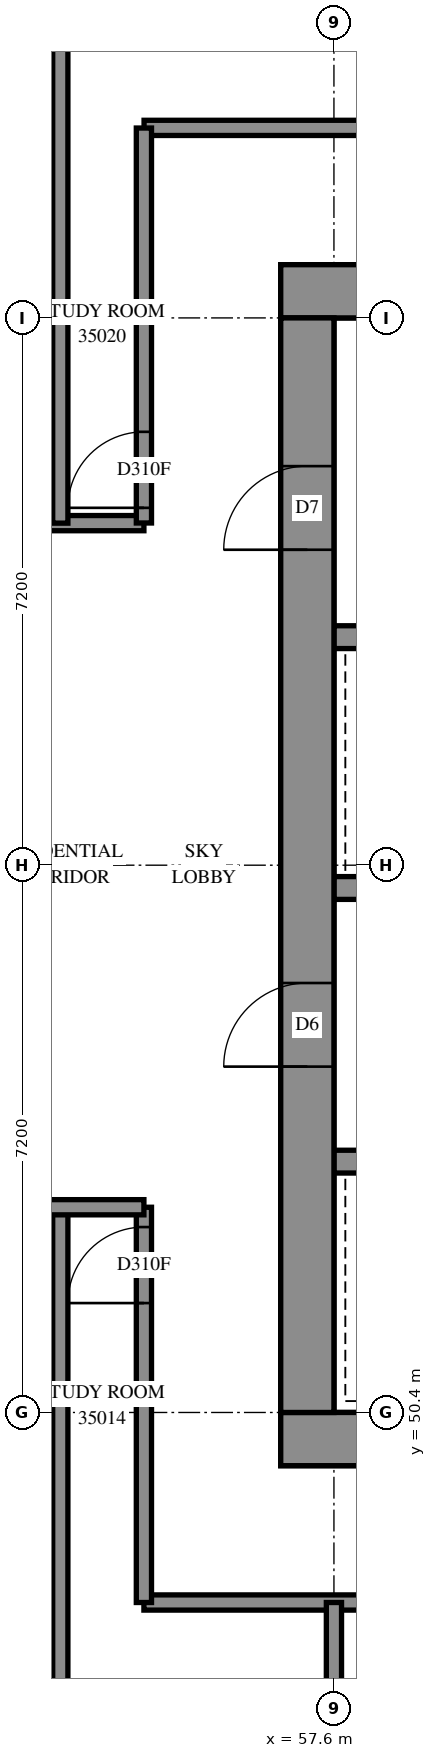
"""IFC4 building model, lengths in metres.
Left out: names, types, materials, properties, quantities, classifications, styles, units other than length and angle.
Written with IfcOpenShell. Run it as: python <this file> out.ifc"""

import sys

from ifc_helpers import new_model, si_unit, direction, frame, frame_2d, origin, place, context, subcontext, project, spatial, rectangle, extrude, element, fill, save


model = new_model("IFC4")
c1 = context("Model", 3, precision=1e-05, world=origin(), true_north=direction((0.0, 1.0)))
c2 = subcontext(c1, "Body", "Model", "MODEL_VIEW")
j1 = project(units=[si_unit("LENGTHUNIT", "METRE"), si_unit("PLANEANGLEUNIT", "RADIAN")], contexts=[c1])
p1 = place(None, origin())
s1 = spatial("IfcSite", under=j1, at=p1, CompositionType="ELEMENT")
p2 = place(p1, origin())
s2 = spatial("IfcBuilding", under=s1, at=p2, CompositionType="ELEMENT")
p3 = place(p2, frame((0.0, 0.0, 131.2)))
s3 = spatial("IfcBuildingStorey", under=s2, at=p3, CompositionType="ELEMENT", Elevation=131.2)
p4 = place(p3, frame((56.9, 50.05, -0.3), z_axis=(0.0, 0.0, 1.0), x_axis=(1.0, 0.0, 0.0)))
e1 = element("IfcWall", 1, at=p4, inside=s3, PredefinedType="SHEAR", context=c2, shape_type="SweptSolid", body=[
    extrude(rectangle(XDim=15.8, YDim=0.7, at=frame_2d((7.9, 0.0))), origin(), (0.0, 0.0, 1.0), 3.5),
])
p5 = place(p3, frame((56.9, 65.15, -0.3), z_axis=(0.0, 0.0, 1.0), x_axis=(1.0, 0.0, 0.0)))
e2 = element("IfcWall", 2, at=p5, inside=s3, PredefinedType="SHEAR", context=c2, shape_type="SweptSolid", body=[
    extrude(rectangle(XDim=15.8, YDim=0.7, at=frame_2d((7.9, 0.0))), origin(), (0.0, 0.0, 1.0), 3.5),
])
p6 = place(p5, frame((10.7, 0.0, 0.3)))
e3 = element("IfcOpeningElement", 3, at=p6, cuts=e2, PredefinedType="OPENING", context=c2, shape_type="SweptSolid", body=[
    extrude(rectangle(XDim=0.8, YDim=2.1, at=frame_2d((0.4, 1.05))), frame((0.0, 0.36, 0.0), z_axis=(0.0, -1.0, 0.0), x_axis=(1.0, 0.0, 0.0)), (0.0, 0.0, 1.0), 0.72),
])
p7 = place(p3, frame((57.25, 50.4, -0.3), z_axis=(0.0, 0.0, 1.0), x_axis=(0.0, 1.0, 0.0)))
e4 = element("IfcWall", 4, at=p7, inside=s3, PredefinedType="SHEAR", context=c2, shape_type="SweptSolid", body=[
    extrude(rectangle(XDim=14.4, YDim=0.7, at=frame_2d((7.2, 0.0))), origin(), (0.0, 0.0, 1.0), 3.5),
])
p8 = place(p7, frame((4.55, 0.0, 0.3)))
e5 = element("IfcOpeningElement", 5, at=p8, cuts=e4, PredefinedType="OPENING", context=c2, shape_type="SweptSolid", body=[
    extrude(rectangle(XDim=1.1, YDim=2.1, at=frame_2d((0.55, 1.05))), frame((0.0, 0.36, 0.0), z_axis=(0.0, -1.0, 0.0), x_axis=(1.0, 0.0, 0.0)), (0.0, 0.0, 1.0), 0.72),
])
p9 = place(p7, frame((11.35, 0.0, 0.3)))
e6 = element("IfcOpeningElement", 6, at=p9, cuts=e4, PredefinedType="OPENING", context=c2, shape_type="SweptSolid", body=[
    extrude(rectangle(XDim=1.1, YDim=2.1, at=frame_2d((0.55, 1.05))), frame((0.0, 0.36, 0.0), z_axis=(0.0, -1.0, 0.0), x_axis=(1.0, 0.0, 0.0)), (0.0, 0.0, 1.0), 0.72),
])
p10 = place(p3, frame((57.6, 53.7, 0.0), z_axis=(0.0, 0.0, 1.0), x_axis=(1.0, 0.0, 0.0)))
e7 = element("IfcWall", 7, at=p10, inside=s3, PredefinedType="SOLIDWALL", context=c2, shape_type="SweptSolid", body=[
    extrude(rectangle(XDim=14.4, YDim=0.3, at=frame_2d((7.2, 0.0))), origin(), (0.0, 0.0, 1.0), 3.9),
])
p11 = place(p10, frame((1.25, 0.0, 0.0)))
e8 = element("IfcOpeningElement", 8, at=p11, cuts=e7, PredefinedType="OPENING", context=c2, shape_type="SweptSolid", body=[
    extrude(rectangle(XDim=1.1, YDim=2.1, at=frame_2d((0.55, 1.05))), frame((0.0, 0.16, 0.0), z_axis=(0.0, -1.0, 0.0), x_axis=(1.0, 0.0, 0.0)), (0.0, 0.0, 1.0), 0.32),
])
p12 = place(p10, frame((4.85, 0.0, 0.0)))
e9 = element("IfcOpeningElement", 9, at=p12, cuts=e7, PredefinedType="OPENING", context=c2, shape_type="SweptSolid", body=[
    extrude(rectangle(XDim=1.1, YDim=2.1, at=frame_2d((0.55, 1.05))), frame((0.0, 0.16, 0.0), z_axis=(0.0, -1.0, 0.0), x_axis=(1.0, 0.0, 0.0)), (0.0, 0.0, 1.0), 0.32),
])
p13 = place(p10, frame((8.45, 0.0, 0.0)))
e10 = element("IfcOpeningElement", 10, at=p13, cuts=e7, PredefinedType="OPENING", context=c2, shape_type="SweptSolid", body=[
    extrude(rectangle(XDim=1.1, YDim=2.1, at=frame_2d((0.55, 1.05))), frame((0.0, 0.16, 0.0), z_axis=(0.0, -1.0, 0.0), x_axis=(1.0, 0.0, 0.0)), (0.0, 0.0, 1.0), 0.32),
])
p14 = place(p10, frame((12.05, 0.0, 0.0)))
e11 = element("IfcOpeningElement", 11, at=p14, cuts=e7, PredefinedType="OPENING", context=c2, shape_type="SweptSolid", body=[
    extrude(rectangle(XDim=1.1, YDim=2.1, at=frame_2d((0.55, 1.05))), frame((0.0, 0.16, 0.0), z_axis=(0.0, -1.0, 0.0), x_axis=(1.0, 0.0, 0.0)), (0.0, 0.0, 1.0), 0.32),
])
p15 = place(p3, frame((57.6, 57.3, 0.0), z_axis=(0.0, 0.0, 1.0), x_axis=(1.0, 0.0, 0.0)))
e12 = element("IfcWall", 12, at=p15, inside=s3, PredefinedType="SOLIDWALL", context=c2, shape_type="SweptSolid", body=[
    extrude(rectangle(XDim=14.4, YDim=0.3, at=frame_2d((7.2, 0.0))), origin(), (0.0, 0.0, 1.0), 3.9),
])
p16 = place(p15, frame((1.25, 0.0, 0.0)))
e13 = element("IfcOpeningElement", 13, at=p16, cuts=e12, PredefinedType="OPENING", context=c2, shape_type="SweptSolid", body=[
    extrude(rectangle(XDim=1.1, YDim=2.1, at=frame_2d((0.55, 1.05))), frame((0.0, 0.16, 0.0), z_axis=(0.0, -1.0, 0.0), x_axis=(1.0, 0.0, 0.0)), (0.0, 0.0, 1.0), 0.32),
])
p17 = place(p15, frame((4.85, 0.0, 0.0)))
e14 = element("IfcOpeningElement", 14, at=p17, cuts=e12, PredefinedType="OPENING", context=c2, shape_type="SweptSolid", body=[
    extrude(rectangle(XDim=1.1, YDim=2.1, at=frame_2d((0.55, 1.05))), frame((0.0, 0.16, 0.0), z_axis=(0.0, -1.0, 0.0), x_axis=(1.0, 0.0, 0.0)), (0.0, 0.0, 1.0), 0.32),
])
p18 = place(p15, frame((8.45, 0.0, 0.0)))
e15 = element("IfcOpeningElement", 15, at=p18, cuts=e12, PredefinedType="OPENING", context=c2, shape_type="SweptSolid", body=[
    extrude(rectangle(XDim=1.1, YDim=2.1, at=frame_2d((0.55, 1.05))), frame((0.0, 0.16, 0.0), z_axis=(0.0, -1.0, 0.0), x_axis=(1.0, 0.0, 0.0)), (0.0, 0.0, 1.0), 0.32),
])
p19 = place(p15, frame((12.05, 0.0, 0.0)))
e16 = element("IfcOpeningElement", 16, at=p19, cuts=e12, PredefinedType="OPENING", context=c2, shape_type="SweptSolid", body=[
    extrude(rectangle(XDim=1.1, YDim=2.1, at=frame_2d((0.55, 1.05))), frame((0.0, 0.16, 0.0), z_axis=(0.0, -1.0, 0.0), x_axis=(1.0, 0.0, 0.0)), (0.0, 0.0, 1.0), 0.32),
])
p20 = place(p3, frame((57.6, 60.6, 0.0), z_axis=(0.0, 0.0, 1.0), x_axis=(1.0, 0.0, 0.0)))
e17 = element("IfcWall", 17, at=p20, inside=s3, PredefinedType="SOLIDWALL", context=c2, shape_type="SweptSolid", body=[
    extrude(rectangle(XDim=7.2, YDim=0.3, at=frame_2d((3.6, 0.0))), origin(), (0.0, 0.0, 1.0), 3.9),
])
p21 = place(p3, frame((55.102, 67.3, 0.0), z_axis=(0.0, 0.0, 1.0), x_axis=(1.0, 0.0, 0.0)))
e18 = element("IfcWall", 18, at=p21, inside=s3, PredefinedType="PARTITIONING", context=c2, shape_type="SweptSolid", body=[
    extrude(rectangle(XDim=19.398, YDim=0.2, at=frame_2d((9.699, 0.0))), origin(), (0.0, 0.0, 1.0), 3.9),
])
p22 = place(p21, frame((8.435, 0.0, 0.0)))
e19 = element("IfcOpeningElement", 19, at=p22, cuts=e18, PredefinedType="OPENING", context=c2, shape_type="SweptSolid", body=[
    extrude(rectangle(XDim=1.0, YDim=2.1, at=frame_2d((0.5, 1.05))), frame((0.0, 0.11, 0.0), z_axis=(0.0, -1.0, 0.0), x_axis=(1.0, 0.0, 0.0)), (0.0, 0.0, 1.0), 0.22),
])
p23 = place(p3, frame((55.1, 47.9, 0.0), z_axis=(0.0, 0.0, 1.0), x_axis=(1.0, 0.0, 0.0)))
e20 = element("IfcWall", 20, at=p23, inside=s3, PredefinedType="PARTITIONING", context=c2, shape_type="SweptSolid", body=[
    extrude(rectangle(XDim=19.208, YDim=0.2, at=frame_2d((9.604, 0.0))), origin(), (0.0, 0.0, 1.0), 3.9),
])
p24 = place(p3, frame((40.502, 62.1, 0.0), z_axis=(0.0, 0.0, 1.0), x_axis=(1.0, 0.0, 0.0)))
e21 = element("IfcWall", 21, at=p24, inside=s3, PredefinedType="PARTITIONING", context=c2, shape_type="SweptSolid", body=[
    extrude(rectangle(XDim=14.598, YDim=0.2, at=frame_2d((7.299, 0.0))), origin(), (0.0, 0.0, 1.0), 3.9),
])
p25 = place(p24, frame((0.265, 0.0, 0.0)))
e22 = element("IfcOpeningElement", 22, at=p25, cuts=e21, PredefinedType="OPENING", context=c2, shape_type="SweptSolid", body=[
    extrude(rectangle(XDim=1.0, YDim=2.1, at=frame_2d((0.5, 1.05))), frame((0.0, 0.11, 0.0), z_axis=(0.0, -1.0, 0.0), x_axis=(1.0, 0.0, 0.0)), (0.0, 0.0, 1.0), 0.22),
])
p26 = place(p24, frame((11.991, 0.0, 0.0)))
e23 = element("IfcOpeningElement", 23, at=p26, cuts=e21, PredefinedType="OPENING", context=c2, shape_type="SweptSolid", body=[
    extrude(rectangle(XDim=1.0, YDim=2.1, at=frame_2d((0.5, 1.05))), frame((0.0, 0.11, 0.0), z_axis=(0.0, -1.0, 0.0), x_axis=(1.0, 0.0, 0.0)), (0.0, 0.0, 1.0), 0.22),
])
for number, where, z_axis, x_axis in (
    (24, (54.0, 45.73, 0.0), (0.0, 0.0, 1.0), (0.0, 1.0, 0.0)),
    (25, (54.0, 62.1, 0.0), (0.0, 0.0, 1.0), (0.0, 1.0, 0.0)),
):
    element("IfcWall", number, at=place(p3, frame(where, z_axis=z_axis, x_axis=x_axis)), inside=s3, PredefinedType="PARTITIONING", context=c2, shape_type="SweptSolid", body=[
        extrude(rectangle(XDim=7.37, YDim=0.2, at=frame_2d((3.685, 0.0))), origin(), (0.0, 0.0, 1.0), 3.9),
    ])
p27 = place(p3, frame((55.1, 47.9, 0.0), z_axis=(0.0, 0.0, 1.0), x_axis=(0.0, 1.0, 0.0)))
e26 = element("IfcWall", 26, at=p27, inside=s3, PredefinedType="PARTITIONING", context=c2, shape_type="SweptSolid", body=[
    extrude(rectangle(XDim=5.2, YDim=0.2, at=frame_2d((2.6, 0.0))), origin(), (0.0, 0.0, 1.0), 3.9),
])
p28 = place(p27, frame((3.939, 0.0, 0.0)))
e27 = element("IfcOpeningElement", 27, at=p28, cuts=e26, PredefinedType="OPENING", context=c2, shape_type="SweptSolid", body=[
    extrude(rectangle(XDim=1.0, YDim=2.1, at=frame_2d((0.5, 1.05))), frame((0.0, 0.11, 0.0), z_axis=(0.0, -1.0, 0.0), x_axis=(1.0, 0.0, 0.0)), (0.0, 0.0, 1.0), 0.22),
])
p29 = place(p3, frame((55.1, 62.102, 0.0), z_axis=(0.0, 0.0, 1.0), x_axis=(0.0, 1.0, 0.0)))
e28 = element("IfcWall", 28, at=p29, inside=s3, PredefinedType="PARTITIONING", context=c2, shape_type="SweptSolid", body=[
    extrude(rectangle(XDim=5.196, YDim=0.2, at=frame_2d((2.598, 0.0))), origin(), (0.0, 0.0, 1.0), 3.9),
])
p30 = place(p29, frame((0.199, 0.0, 0.0)))
e29 = element("IfcOpeningElement", 29, at=p30, cuts=e28, PredefinedType="OPENING", context=c2, shape_type="SweptSolid", body=[
    extrude(rectangle(XDim=1.0, YDim=2.1, at=frame_2d((0.5, 1.05))), frame((0.0, 0.11, 0.0), z_axis=(0.0, -1.0, 0.0), x_axis=(1.0, 0.0, 0.0)), (0.0, 0.0, 1.0), 0.22),
])
p31 = place(p3, frame((50.4, 53.1, 0.0), z_axis=(0.0, 0.0, 1.0), x_axis=(1.0, 0.0, 0.0)))
e30 = element("IfcWall", 30, at=p31, inside=s3, PredefinedType="PARTITIONING", context=c2, shape_type="SweptSolid", body=[
    extrude(rectangle(XDim=4.7, YDim=0.2, at=frame_2d((2.35, 0.0))), origin(), (0.0, 0.0, 1.0), 3.9),
])
p32 = place(p3, frame((57.6, 45.73, 0.0), z_axis=(0.0, 0.0, 1.0), x_axis=(0.0, 1.0, 0.0)))
e31 = element("IfcWall", 31, at=p32, inside=s3, PredefinedType="PARTITIONING", context=c2, shape_type="SweptSolid", body=[
    extrude(rectangle(XDim=2.17, YDim=0.2, at=frame_2d((1.085, 0.0))), origin(), (0.0, 0.0, 1.0), 3.9),
])
p33 = place(p8, origin())
e32 = element("IfcDoor", 32, at=p33, inside=s3, OperationType="DOUBLE_DOOR_SINGLE_SWING", PredefinedType="DOOR", context=c2, shape_type="SweptSolid", body=[
    extrude(rectangle(XDim=1.1, YDim=2.1, at=frame_2d((0.55, 1.05))), frame((0.0, 0.025, 0.0), z_axis=(0.0, -1.0, 0.0), x_axis=(1.0, 0.0, 0.0)), (0.0, 0.0, 1.0), 0.05),
])
fill(e5, e32)
p34 = place(p9, origin())
e33 = element("IfcDoor", 33, at=p34, inside=s3, OperationType="SINGLE_SWING_LEFT", PredefinedType="DOOR", context=c2, shape_type="SweptSolid", body=[
    extrude(rectangle(XDim=1.1, YDim=2.1, at=frame_2d((0.55, 1.05))), frame((0.0, 0.025, 0.0), z_axis=(0.0, -1.0, 0.0), x_axis=(1.0, 0.0, 0.0)), (0.0, 0.0, 1.0), 0.05),
])
fill(e6, e33)
p35 = place(p28, origin())
e34 = element("IfcDoor", 34, at=p35, inside=s3, OperationType="SINGLE_SWING_RIGHT", PredefinedType="DOOR", context=c2, shape_type="SweptSolid", body=[
    extrude(rectangle(XDim=1.0, YDim=2.1, at=frame_2d((0.5, 1.05))), frame((0.0, 0.025, 0.0), z_axis=(0.0, -1.0, 0.0), x_axis=(1.0, 0.0, 0.0)), (0.0, 0.0, 1.0), 0.05),
])
fill(e27, e34)
p36 = place(p30, origin())
e35 = element("IfcDoor", 35, at=p36, inside=s3, OperationType="SINGLE_SWING_LEFT", PredefinedType="DOOR", context=c2, shape_type="SweptSolid", body=[
    extrude(rectangle(XDim=1.0, YDim=2.1, at=frame_2d((0.5, 1.05))), frame((0.0, 0.025, 0.0), z_axis=(0.0, -1.0, 0.0), x_axis=(1.0, 0.0, 0.0)), (0.0, 0.0, 1.0), 0.05),
])
fill(e29, e35)
save(model, sys.argv[1])
